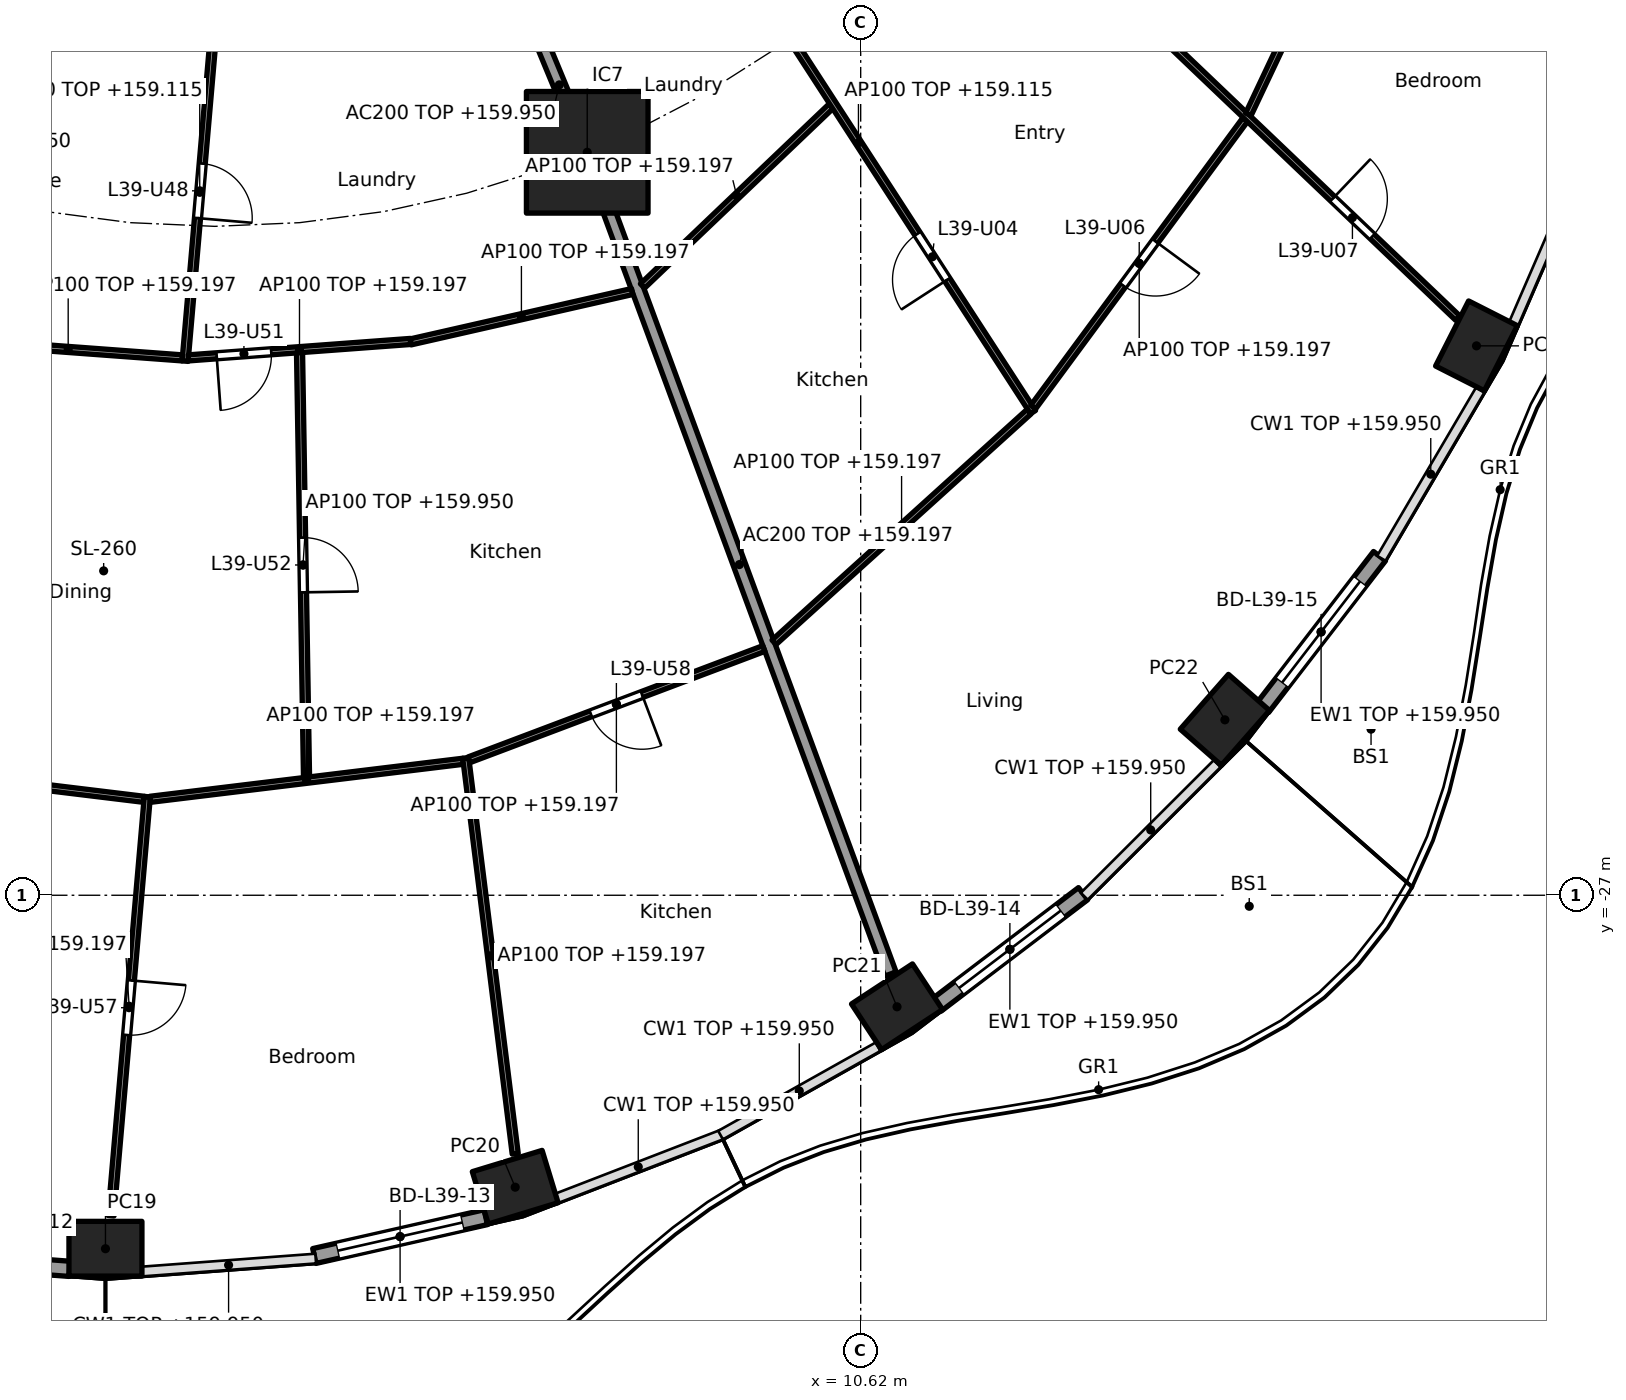
"""IFC4 building model, lengths in metres.
Left out: names, types, materials, properties, quantities, classifications, styles, units other than length and angle.
Written with IfcOpenShell. Run it as: python <this file> out.ifc"""

import sys

from ifc_helpers import new_model, si_unit, direction, frame, frame_2d, origin, origin_2d, place, context, subcontext, project, spatial, rectangle, hollow_rectangle, extrude, element, fill, save


model = new_model("IFC4")
c1 = context("Model", 3, precision=1e-05, world=origin(), true_north=direction((0.0, 1.0)))
c2 = subcontext(c1, "Body", "Model", "MODEL_VIEW")
j1 = project(units=[si_unit("LENGTHUNIT", "METRE"), si_unit("PLANEANGLEUNIT", "RADIAN")], contexts=[c1])
p1 = place(None, origin())
s1 = spatial("IfcSite", under=j1, at=p1, CompositionType="ELEMENT")
p2 = place(p1, origin())
s2 = spatial("IfcBuilding", under=s1, at=p2, CompositionType="ELEMENT")
p3 = place(p2, frame((0.0, 0.0, 156.6)))
s3 = spatial("IfcBuildingStorey", under=s2, at=p3, CompositionType="ELEMENT", Elevation=156.6)
for number, where, z_axis, x_axis in (
    (1, (-1.8, -32.813, 0.0), (0.0, 0.0, 1.0), (1.0, 0.0, 0.0)),
    (2, (4.938, -31.801, 0.0), (0.0, 0.0, 1.0), (0.957, 0.292, 0.0)),
    (3, (11.218, -28.834, 0.0), (0.0, 0.0, 1.0), (0.836, 0.549, 0.0)),
    (4, (16.61, -24.115, 0.0), (0.0, 0.0, 1.0), (0.66, 0.751, 0.0)),
    (5, (20.747, -17.965, 0.0), (0.0, 0.0, 1.0), (0.452, 0.892, 0.0)),
):
    element("IfcColumn", number, at=place(p3, frame(where, z_axis=z_axis, x_axis=x_axis)), inside=s3, PredefinedType="COLUMN", context=c2, shape_type="SweptSolid", body=[
        extrude(hollow_rectangle(XDim=1.2, YDim=0.9, WallThickness=0.04, at=origin_2d()), origin(), (0.0, 0.0, 1.0), 3.7),
    ])
p4 = place(p3, frame((6.123, -14.782, 0.0), z_axis=(0.0, 0.0, 1.0), x_axis=(1.0, 0.0, 0.0)))
e6 = element("IfcColumn", 6, at=p4, inside=s3, PredefinedType="COLUMN", context=c2, shape_type="SweptSolid", body=[
    extrude(rectangle(XDim=2.0, YDim=2.0, at=origin_2d()), origin(), (0.0, 0.0, 1.0), 3.7),
])
p5 = place(p3, frame((-2.389, -33.143, 0.0), z_axis=(0.0, 0.0, 1.0), x_axis=(-0.997231697044, 0.074356858535, 0.0)))
e7 = element("IfcWall", 7, at=p5, inside=s3, PredefinedType="SOLIDWALL", context=c2, shape_type="SweptSolid", body=[
    extrude(rectangle(XDim=2.873, YDim=0.25, at=frame_2d((1.437, 0.0))), origin(), (0.0, 0.0, 1.0), 3.35),
])
p6 = place(p5, frame((0.386, 0.0, 0.0)))
e8 = element("IfcOpeningElement", 8, at=p6, cuts=e7, PredefinedType="OPENING", context=c2, shape_type="SweptSolid", body=[
    extrude(rectangle(XDim=2.1, YDim=2.4, at=frame_2d((1.05, 1.2))), frame((0.0, 0.135, 0.0), z_axis=(0.0, -1.0, 0.0), x_axis=(1.0, 0.0, 0.0)), (0.0, 0.0, 1.0), 0.27),
])
p7 = place(p3, frame((4.455, -32.294, 0.0), z_axis=(0.0, 0.0, 1.0), x_axis=(-0.975339035722, -0.220711951186, 0.0)))
e9 = element("IfcWall", 9, at=p7, inside=s3, PredefinedType="SOLIDWALL", context=c2, shape_type="SweptSolid", body=[
    extrude(rectangle(XDim=2.89, YDim=0.25, at=frame_2d((1.445, 0.0))), origin(), (0.0, 0.0, 1.0), 3.35),
])
p8 = place(p7, frame((0.395, 0.0, 0.0)))
e10 = element("IfcOpeningElement", 10, at=p8, cuts=e9, PredefinedType="OPENING", context=c2, shape_type="SweptSolid", body=[
    extrude(rectangle(XDim=2.1, YDim=2.4, at=frame_2d((1.05, 1.2))), frame((0.0, 0.135, 0.0), z_axis=(0.0, -1.0, 0.0), x_axis=(1.0, 0.0, 0.0)), (0.0, 0.0, 1.0), 0.27),
])
p9 = place(p3, frame((14.278, -26.973, 0.0), z_axis=(0.0, 0.0, 1.0), x_axis=(-0.796022231079, -0.605267385233, 0.0)))
e11 = element("IfcWall", 11, at=p9, inside=s3, PredefinedType="SOLIDWALL", context=c2, shape_type="SweptSolid", body=[
    extrude(rectangle(XDim=3.026, YDim=0.25, at=frame_2d((1.513, 0.0))), origin(), (0.0, 0.0, 1.0), 3.35),
])
p10 = place(p9, frame((0.463, 0.0, 0.0)))
e12 = element("IfcOpeningElement", 12, at=p10, cuts=e11, PredefinedType="OPENING", context=c2, shape_type="SweptSolid", body=[
    extrude(rectangle(XDim=2.1, YDim=2.4, at=frame_2d((1.05, 1.2))), frame((0.0, 0.135, 0.0), z_axis=(0.0, -1.0, 0.0), x_axis=(1.0, 0.0, 0.0)), (0.0, 0.0, 1.0), 0.27),
])
p11 = place(p3, frame((19.153, -21.423, 0.0), z_axis=(0.0, 0.0, 1.0), x_axis=(-0.610429847179, -0.792070326217, 0.0)))
e13 = element("IfcWall", 13, at=p11, inside=s3, PredefinedType="SOLIDWALL", context=c2, shape_type="SweptSolid", body=[
    extrude(rectangle(XDim=3.149, YDim=0.25, at=frame_2d((1.575, 0.0))), origin(), (0.0, 0.0, 1.0), 3.35),
])
p12 = place(p11, frame((0.525, 0.0, 0.0)))
e14 = element("IfcOpeningElement", 14, at=p12, cuts=e13, PredefinedType="OPENING", context=c2, shape_type="SweptSolid", body=[
    extrude(rectangle(XDim=2.1, YDim=2.4, at=frame_2d((1.05, 1.2))), frame((0.0, 0.135, 0.0), z_axis=(0.0, -1.0, 0.0), x_axis=(1.0, 0.0, 0.0)), (0.0, 0.0, 1.0), 0.27),
])
p13 = place(p3, frame((5.243, -12.657, 0.0), z_axis=(0.0, 0.0, 1.0), x_axis=(0.38273085373, -0.923859888513, 0.0)))
e15 = element("IfcWall", 15, at=p13, inside=s3, PredefinedType="PARTITIONING", context=c2, shape_type="SweptSolid", body=[
    extrude(rectangle(XDim=2.199, YDim=0.2, at=frame_2d((1.1, 0.0))), origin(), (0.0, 0.0, 1.0), 3.35),
])
p14 = place(p3, frame((6.14, -14.829, 0.0), z_axis=(0.0, 0.0, 1.0), x_axis=(0.346169582481, -0.938171956608, 0.0)))
e16 = element("IfcWall", 16, at=p14, inside=s3, PredefinedType="PARTITIONING", context=c2, shape_type="SweptSolid", body=[
    extrude(rectangle(XDim=14.354, YDim=0.2, at=frame_2d((7.177, 0.0))), origin(), (0.0, 0.0, 1.0), 2.597),
])
p15 = place(p3, frame((-4.29, -17.885, 0.0), z_axis=(0.0, 0.0, 1.0), x_axis=(0.997272353708, -0.073809569363, 0.0)))
e17 = element("IfcWall", 17, at=p15, inside=s3, PredefinedType="PARTITIONING", context=c2, shape_type="SweptSolid", body=[
    extrude(rectangle(XDim=3.764, YDim=0.1, at=frame_2d((1.882, 0.0))), origin(), (0.0, 0.0, 1.0), 2.597),
])
p16 = place(p3, frame((-6.413, -24.784, 0.0), z_axis=(0.0, 0.0, 1.0), x_axis=(0.992690077723, -0.120691381588, 0.0)))
e18 = element("IfcWall", 18, at=p16, inside=s3, PredefinedType="PARTITIONING", context=c2, shape_type="SweptSolid", body=[
    extrude(rectangle(XDim=5.286, YDim=0.1, at=frame_2d((2.643, 0.0))), origin(), (0.0, 0.0, 1.0), 2.597),
])
p17 = place(p16, frame((2.218, 0.0, 0.0)))
e19 = element("IfcOpeningElement", 19, at=p17, cuts=e18, PredefinedType="OPENING", context=c2, shape_type="SweptSolid", body=[
    extrude(rectangle(XDim=0.9, YDim=2.1, at=frame_2d((0.45, 1.05))), frame((0.0, 0.06, 0.0), z_axis=(0.0, -1.0, 0.0), x_axis=(1.0, 0.0, 0.0)), (0.0, 0.0, 1.0), 0.12),
])
p18 = place(p3, frame((-0.009, -12.664, 0.0), z_axis=(0.0, 0.0, 1.0), x_axis=(-0.086431127211, -0.9962578282, 0.0)))
e20 = element("IfcWall", 20, at=p18, inside=s3, PredefinedType="PARTITIONING", context=c2, shape_type="SweptSolid", body=[
    extrude(rectangle(XDim=5.573, YDim=0.1, at=frame_2d((2.787, 0.0))), origin(), (0.0, 0.0, 1.0), 2.515),
])
p19 = place(p18, frame((2.312, 0.0, 0.0)))
e21 = element("IfcOpeningElement", 21, at=p19, cuts=e20, PredefinedType="OPENING", context=c2, shape_type="SweptSolid", body=[
    extrude(rectangle(XDim=0.9, YDim=2.1, at=frame_2d((0.45, 1.05))), frame((0.0, 0.06, 0.0), z_axis=(0.0, -1.0, 0.0), x_axis=(1.0, 0.0, 0.0)), (0.0, 0.0, 1.0), 0.12),
])
p20 = place(p3, frame((-0.436, -18.163, 0.0), z_axis=(0.0, 0.0, 1.0), x_axis=(0.997271025958, 0.073827506966, 0.0)))
e22 = element("IfcWall", 22, at=p20, inside=s3, PredefinedType="PARTITIONING", context=c2, shape_type="SweptSolid", body=[
    extrude(rectangle(XDim=3.664, YDim=0.1, at=frame_2d((1.832, 0.0))), origin(), (0.0, 0.0, 1.0), 2.597),
])
p21 = place(p20, frame((0.466, 0.0, 0.0)))
e23 = element("IfcOpeningElement", 23, at=p21, cuts=e22, PredefinedType="OPENING", context=c2, shape_type="SweptSolid", body=[
    extrude(rectangle(XDim=0.9, YDim=2.1, at=frame_2d((0.45, 1.05))), frame((0.0, 0.06, 0.0), z_axis=(0.0, -1.0, 0.0), x_axis=(1.0, 0.0, 0.0)), (0.0, 0.0, 1.0), 0.12),
])
p22 = place(p3, frame((-1.112, -25.379, 0.0), z_axis=(0.0, 0.0, 1.0), x_axis=(-0.08643315117, -0.996257652607, 0.0)))
e24 = element("IfcWall", 24, at=p22, inside=s3, PredefinedType="PARTITIONING", context=c2, shape_type="SweptSolid", body=[
    extrude(rectangle(XDim=6.917, YDim=0.1, at=frame_2d((3.459, 0.0))), origin(), (0.0, 0.0, 1.0), 2.597),
])
p23 = place(p22, frame((3.034, 0.0, 0.0)))
e25 = element("IfcOpeningElement", 25, at=p23, cuts=e24, PredefinedType="OPENING", context=c2, shape_type="SweptSolid", body=[
    extrude(rectangle(XDim=0.9, YDim=2.1, at=frame_2d((0.45, 1.05))), frame((0.0, 0.06, 0.0), z_axis=(0.0, -1.0, 0.0), x_axis=(1.0, 0.0, 0.0)), (0.0, 0.0, 1.0), 0.12),
])
p24 = place(p3, frame((-1.066, -25.422, 0.0), z_axis=(0.0, 0.0, 1.0), x_axis=(0.992692993044, 0.120667400577, 0.0)))
e26 = element("IfcWall", 26, at=p24, inside=s3, PredefinedType="PARTITIONING", context=c2, shape_type="SweptSolid", body=[
    extrude(rectangle(XDim=5.186, YDim=0.1, at=frame_2d((2.593, 0.0))), origin(), (0.0, 0.0, 1.0), 2.597),
])
p25 = place(p3, frame((1.392, -18.078, 0.0), z_axis=(0.0, 0.0, 1.0), x_axis=(0.016433071124, -0.99986496797, 0.0)))
e27 = element("IfcWall", 27, at=p25, inside=s3, PredefinedType="PARTITIONING", context=c2, shape_type="SweptSolid", body=[
    extrude(rectangle(XDim=6.983, YDim=0.1, at=frame_2d((3.491, 0.0))), origin(), (0.0, 0.0, 1.0), 3.35),
])
p26 = place(p25, frame((3.041, 0.0, 0.0)))
e28 = element("IfcOpeningElement", 28, at=p26, cuts=e27, PredefinedType="OPENING", context=c2, shape_type="SweptSolid", body=[
    extrude(rectangle(XDim=0.9, YDim=2.1, at=frame_2d((0.45, 1.05))), frame((0.0, 0.06, 0.0), z_axis=(0.0, -1.0, 0.0), x_axis=(1.0, 0.0, 0.0)), (0.0, 0.0, 1.0), 0.12),
])
p27 = place(p3, frame((3.219, -17.9, 0.0), z_axis=(0.0, 0.0, 1.0), x_axis=(0.975106528652, 0.22173691118, 0.0)))
e29 = element("IfcWall", 29, at=p27, inside=s3, PredefinedType="PARTITIONING", context=c2, shape_type="SweptSolid", body=[
    extrude(rectangle(XDim=3.736, YDim=0.1, at=frame_2d((1.868, 0.0))), origin(), (0.0, 0.0, 1.0), 2.597),
])
p28 = place(p3, frame((4.125, -24.741, 0.0), z_axis=(0.0, 0.0, 1.0), x_axis=(0.124066794607, -0.992273868685, 0.0)))
e30 = element("IfcWall", 30, at=p28, inside=s3, PredefinedType="PARTITIONING", context=c2, shape_type="SweptSolid", body=[
    extrude(rectangle(XDim=6.561, YDim=0.1, at=frame_2d((3.28, 0.0))), origin(), (0.0, 0.0, 1.0), 2.597),
])
p29 = place(p3, frame((4.178, -24.773, 0.0), z_axis=(0.0, 0.0, 1.0), x_axis=(0.935583811437, 0.353104703702, 0.0)))
e31 = element("IfcWall", 31, at=p29, inside=s3, PredefinedType="PARTITIONING", context=c2, shape_type="SweptSolid", body=[
    extrude(rectangle(XDim=5.184, YDim=0.1, at=frame_2d((2.592, 0.0))), origin(), (0.0, 0.0, 1.0), 2.597),
])
p30 = place(p29, frame((2.142, 0.0, 0.0)))
e32 = element("IfcOpeningElement", 32, at=p30, cuts=e31, PredefinedType="OPENING", context=c2, shape_type="SweptSolid", body=[
    extrude(rectangle(XDim=0.9, YDim=2.1, at=frame_2d((0.45, 1.05))), frame((0.0, 0.06, 0.0), z_axis=(0.0, -1.0, 0.0), x_axis=(1.0, 0.0, 0.0)), (0.0, 0.0, 1.0), 0.12),
])
p31 = place(p3, frame((7.032, -16.98, 0.0), z_axis=(0.0, 0.0, 1.0), x_axis=(0.723709759148, 0.690104473622, 0.0)))
e33 = element("IfcWall", 33, at=p31, inside=s3, PredefinedType="PARTITIONING", context=c2, shape_type="SweptSolid", body=[
    extrude(rectangle(XDim=4.286, YDim=0.1, at=frame_2d((2.143, 0.0))), origin(), (0.0, 0.0, 1.0), 2.597),
])
p32 = place(p3, frame((9.195, -22.84, 0.0), z_axis=(0.0, 0.0, 1.0), x_axis=(0.741675855479, 0.670758470241, 0.0)))
e34 = element("IfcWall", 34, at=p32, inside=s3, PredefinedType="PARTITIONING", context=c2, shape_type="SweptSolid", body=[
    extrude(rectangle(XDim=5.656, YDim=0.1, at=frame_2d((2.828, 0.0))), origin(), (0.0, 0.0, 1.0), 2.597),
])
p33 = place(p3, frame((7.712, -10.195, 0.0), z_axis=(0.0, 0.0, 1.0), x_axis=(0.543868615753, -0.839170381269, 0.0)))
e35 = element("IfcWall", 35, at=p33, inside=s3, PredefinedType="PARTITIONING", context=c2, shape_type="SweptSolid", body=[
    extrude(rectangle(XDim=10.558, YDim=0.1, at=frame_2d((5.279, 0.0))), origin(), (0.0, 0.0, 1.0), 2.515),
])
p34 = place(p33, frame((1.81, 0.0, 0.0)))
e36 = element("IfcOpeningElement", 36, at=p34, cuts=e35, PredefinedType="OPENING", context=c2, shape_type="SweptSolid", body=[
    extrude(rectangle(XDim=0.9, YDim=2.1, at=frame_2d((0.45, 1.05))), frame((0.0, 0.06, 0.0), z_axis=(0.0, -1.0, 0.0), x_axis=(1.0, 0.0, 0.0)), (0.0, 0.0, 1.0), 0.12),
])
p35 = place(p33, frame((7.064, 0.0, 0.0)))
e37 = element("IfcOpeningElement", 37, at=p35, cuts=e35, PredefinedType="OPENING", context=c2, shape_type="SweptSolid", body=[
    extrude(rectangle(XDim=0.9, YDim=2.1, at=frame_2d((0.45, 1.05))), frame((0.0, 0.06, 0.0), z_axis=(0.0, -1.0, 0.0), x_axis=(1.0, 0.0, 0.0)), (0.0, 0.0, 1.0), 0.12),
])
p36 = place(p3, frame((13.457, -18.973, 0.0), z_axis=(0.0, 0.0, 1.0), x_axis=(0.593532053206, 0.80481035146, 0.0)))
e38 = element("IfcWall", 38, at=p36, inside=s3, PredefinedType="PARTITIONING", context=c2, shape_type="SweptSolid", body=[
    extrude(rectangle(XDim=5.876, YDim=0.1, at=frame_2d((2.938, 0.0))), origin(), (0.0, 0.0, 1.0), 2.597),
])
p37 = place(p36, frame((2.488, 0.0, 0.0)))
e39 = element("IfcOpeningElement", 39, at=p37, cuts=e38, PredefinedType="OPENING", context=c2, shape_type="SweptSolid", body=[
    extrude(rectangle(XDim=0.9, YDim=2.1, at=frame_2d((0.45, 1.05))), frame((0.0, 0.06, 0.0), z_axis=(0.0, -1.0, 0.0), x_axis=(1.0, 0.0, 0.0)), (0.0, 0.0, 1.0), 0.12),
])
p38 = place(p3, frame((10.184, -7.727, 0.0), z_axis=(0.0, 0.0, 1.0), x_axis=(0.723635100101, -0.690182759783, 0.0)))
e40 = element("IfcWall", 40, at=p38, inside=s3, PredefinedType="PARTITIONING", context=c2, shape_type="SweptSolid", body=[
    extrude(rectangle(XDim=14.173, YDim=0.1, at=frame_2d((7.086, 0.0))), origin(), (0.0, 0.0, 1.0), 2.515),
])
p39 = place(p38, frame((1.565, 0.0, 0.0)))
e41 = element("IfcOpeningElement", 41, at=p39, cuts=e40, PredefinedType="OPENING", context=c2, shape_type="SweptSolid", body=[
    extrude(rectangle(XDim=0.9, YDim=2.1, at=frame_2d((0.45, 1.05))), frame((0.0, 0.06, 0.0), z_axis=(0.0, -1.0, 0.0), x_axis=(1.0, 0.0, 0.0)), (0.0, 0.0, 1.0), 0.12),
])
p40 = place(p38, frame((6.257, 0.0, 0.0)))
e42 = element("IfcOpeningElement", 42, at=p40, cuts=e40, PredefinedType="OPENING", context=c2, shape_type="SweptSolid", body=[
    extrude(rectangle(XDim=0.9, YDim=2.1, at=frame_2d((0.45, 1.05))), frame((0.0, 0.06, 0.0), z_axis=(0.0, -1.0, 0.0), x_axis=(1.0, 0.0, 0.0)), (0.0, 0.0, 1.0), 0.12),
])
p41 = place(p38, frame((11.328, 0.0, 0.0)))
e43 = element("IfcOpeningElement", 43, at=p41, cuts=e40, PredefinedType="OPENING", context=c2, shape_type="SweptSolid", body=[
    extrude(rectangle(XDim=0.9, YDim=2.1, at=frame_2d((0.45, 1.05))), frame((0.0, 0.06, 0.0), z_axis=(0.0, -1.0, 0.0), x_axis=(1.0, 0.0, 0.0)), (0.0, 0.0, 1.0), 0.12),
])
p42 = place(p3, frame((16.995, -14.158, 0.0), z_axis=(0.0, 0.0, 1.0), x_axis=(0.427436809038, 0.904045228005, 0.0)))
e44 = element("IfcWall", 44, at=p42, inside=s3, PredefinedType="PARTITIONING", context=c2, shape_type="SweptSolid", body=[
    extrude(rectangle(XDim=5.963, YDim=0.1, at=frame_2d((2.981, 0.0))), origin(), (0.0, 0.0, 1.0), 2.597),
])
p43 = place(p42, frame((4.035, 0.0, 0.0)))
e45 = element("IfcOpeningElement", 45, at=p43, cuts=e44, PredefinedType="OPENING", context=c2, shape_type="SweptSolid", body=[
    extrude(rectangle(XDim=0.9, YDim=2.1, at=frame_2d((0.45, 1.05))), frame((0.0, 0.06, 0.0), z_axis=(0.0, -1.0, 0.0), x_axis=(1.0, 0.0, 0.0)), (0.0, 0.0, 1.0), 0.12),
])
p44 = place(p8, origin())
e46 = element("IfcDoor", 46, at=p44, inside=s3, OperationType="SLIDING_TO_LEFT", PredefinedType="DOOR", context=c2, shape_type="SweptSolid", body=[
    extrude(rectangle(XDim=2.1, YDim=2.4, at=frame_2d((1.05, 1.2))), frame((0.0, 0.025, 0.0), z_axis=(0.0, -1.0, 0.0), x_axis=(1.0, 0.0, 0.0)), (0.0, 0.0, 1.0), 0.05),
])
fill(e10, e46)
p45 = place(p10, origin())
e47 = element("IfcDoor", 47, at=p45, inside=s3, OperationType="SLIDING_TO_LEFT", PredefinedType="DOOR", context=c2, shape_type="SweptSolid", body=[
    extrude(rectangle(XDim=2.1, YDim=2.4, at=frame_2d((1.05, 1.2))), frame((0.0, 0.025, 0.0), z_axis=(0.0, -1.0, 0.0), x_axis=(1.0, 0.0, 0.0)), (0.0, 0.0, 1.0), 0.05),
])
fill(e12, e47)
p46 = place(p12, origin())
e48 = element("IfcDoor", 48, at=p46, inside=s3, OperationType="SLIDING_TO_LEFT", PredefinedType="DOOR", context=c2, shape_type="SweptSolid", body=[
    extrude(rectangle(XDim=2.1, YDim=2.4, at=frame_2d((1.05, 1.2))), frame((0.0, 0.025, 0.0), z_axis=(0.0, -1.0, 0.0), x_axis=(1.0, 0.0, 0.0)), (0.0, 0.0, 1.0), 0.05),
])
fill(e14, e48)
p47 = place(p35, frame((0.9, 0.0, 0.0), x_axis=(-1.0, 0.0, 0.0)))
e49 = element("IfcDoor", 49, at=p47, inside=s3, OperationType="SINGLE_SWING_LEFT", PredefinedType="DOOR", context=c2, shape_type="SweptSolid", body=[
    extrude(rectangle(XDim=0.9, YDim=2.1, at=frame_2d((0.45, 1.05))), frame((0.0, 0.025, 0.0), z_axis=(0.0, -1.0, 0.0), x_axis=(1.0, 0.0, 0.0)), (0.0, 0.0, 1.0), 0.05),
])
fill(e37, e49)
p48 = place(p37, frame((0.9, 0.0, 0.0), x_axis=(-1.0, 0.0, 0.0)))
e50 = element("IfcDoor", 50, at=p48, inside=s3, OperationType="SINGLE_SWING_LEFT", PredefinedType="DOOR", context=c2, shape_type="SweptSolid", body=[
    extrude(rectangle(XDim=0.9, YDim=2.1, at=frame_2d((0.45, 1.05))), frame((0.0, 0.025, 0.0), z_axis=(0.0, -1.0, 0.0), x_axis=(1.0, 0.0, 0.0)), (0.0, 0.0, 1.0), 0.05),
])
fill(e39, e50)
p49 = place(p41, origin())
e51 = element("IfcDoor", 51, at=p49, inside=s3, OperationType="SINGLE_SWING_LEFT", PredefinedType="DOOR", context=c2, shape_type="SweptSolid", body=[
    extrude(rectangle(XDim=0.9, YDim=2.1, at=frame_2d((0.45, 1.05))), frame((0.0, 0.025, 0.0), z_axis=(0.0, -1.0, 0.0), x_axis=(1.0, 0.0, 0.0)), (0.0, 0.0, 1.0), 0.05),
])
fill(e43, e51)
p50 = place(p19, origin())
e52 = element("IfcDoor", 52, at=p50, inside=s3, OperationType="SINGLE_SWING_RIGHT", PredefinedType="DOOR", context=c2, shape_type="SweptSolid", body=[
    extrude(rectangle(XDim=0.9, YDim=2.1, at=frame_2d((0.45, 1.05))), frame((0.0, 0.025, 0.0), z_axis=(0.0, -1.0, 0.0), x_axis=(1.0, 0.0, 0.0)), (0.0, 0.0, 1.0), 0.05),
])
fill(e21, e52)
p51 = place(p21, frame((0.9, 0.0, 0.0), x_axis=(-1.0, 0.0, 0.0)))
e53 = element("IfcDoor", 53, at=p51, inside=s3, OperationType="SINGLE_SWING_RIGHT", PredefinedType="DOOR", context=c2, shape_type="SweptSolid", body=[
    extrude(rectangle(XDim=0.9, YDim=2.1, at=frame_2d((0.45, 1.05))), frame((0.0, 0.025, 0.0), z_axis=(0.0, -1.0, 0.0), x_axis=(1.0, 0.0, 0.0)), (0.0, 0.0, 1.0), 0.05),
])
fill(e23, e53)
p52 = place(p26, origin())
e54 = element("IfcDoor", 54, at=p52, inside=s3, OperationType="SINGLE_SWING_RIGHT", PredefinedType="DOOR", context=c2, shape_type="SweptSolid", body=[
    extrude(rectangle(XDim=0.9, YDim=2.1, at=frame_2d((0.45, 1.05))), frame((0.0, 0.025, 0.0), z_axis=(0.0, -1.0, 0.0), x_axis=(1.0, 0.0, 0.0)), (0.0, 0.0, 1.0), 0.05),
])
fill(e28, e54)
p53 = place(p23, origin())
e55 = element("IfcDoor", 55, at=p53, inside=s3, OperationType="SINGLE_SWING_LEFT", PredefinedType="DOOR", context=c2, shape_type="SweptSolid", body=[
    extrude(rectangle(XDim=0.9, YDim=2.1, at=frame_2d((0.45, 1.05))), frame((0.0, 0.025, 0.0), z_axis=(0.0, -1.0, 0.0), x_axis=(1.0, 0.0, 0.0)), (0.0, 0.0, 1.0), 0.05),
])
fill(e25, e55)
p54 = place(p30, frame((0.9, 0.0, 0.0), x_axis=(-1.0, 0.0, 0.0)))
e56 = element("IfcDoor", 56, at=p54, inside=s3, OperationType="SINGLE_SWING_LEFT", PredefinedType="DOOR", context=c2, shape_type="SweptSolid", body=[
    extrude(rectangle(XDim=0.9, YDim=2.1, at=frame_2d((0.45, 1.05))), frame((0.0, 0.025, 0.0), z_axis=(0.0, -1.0, 0.0), x_axis=(1.0, 0.0, 0.0)), (0.0, 0.0, 1.0), 0.05),
])
fill(e32, e56)
save(model, sys.argv[1])
